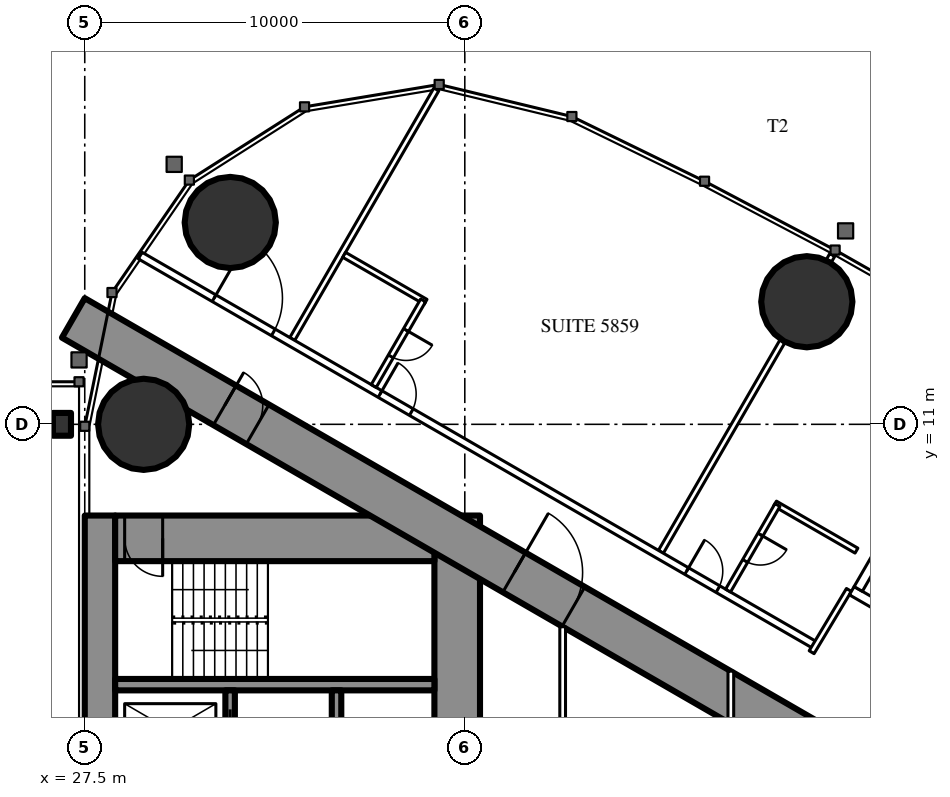
"""IFC4 building model, lengths in metres.
Left out: names, types, materials, properties, quantities, classifications, styles, units other than length and angle.
Written with IfcOpenShell. Run it as: python <this file> out.ifc"""

import sys

from ifc_helpers import new_model, si_unit, direction, frame, frame_2d, origin, origin_2d, place, context, subcontext, project, spatial, rectangle, circle, i_section, extrude, element, fill, save


model = new_model("IFC4")
c1 = context("Model", 3, precision=1e-05, world=origin(), true_north=direction((0.0, 1.0)))
c2 = subcontext(c1, "Body", "Model", "MODEL_VIEW")
j1 = project(units=[si_unit("LENGTHUNIT", "METRE"), si_unit("PLANEANGLEUNIT", "RADIAN")], contexts=[c1])
p1 = place(None, origin())
s1 = spatial("IfcSite", under=j1, at=p1, CompositionType="ELEMENT")
p2 = place(p1, origin())
s2 = spatial("IfcBuilding", under=s1, at=p2, CompositionType="ELEMENT")
p3 = place(p2, frame((0.0, 0.0, 218.9)))
s3 = spatial("IfcBuildingStorey", under=s2, at=p3, CompositionType="ELEMENT", Elevation=218.9)
for number, where, z_axis, x_axis in (
    (1, (31.328, 16.311, 0.0), (0.0, 0.0, 1.0), (1.0, 0.0, 0.0)),
    (2, (29.05, 11.0, 0.0), (0.0, 0.0, 1.0), (1.0, 0.0, 0.0)),
    (3, (46.499, 14.226, 0.0), (0.0, 0.0, 1.0), (1.0, 0.0, 0.0)),
):
    element("IfcColumn", number, at=place(p3, frame(where, z_axis=z_axis, x_axis=x_axis)), inside=s3, PredefinedType="COLUMN", context=c2, shape_type="SweptSolid", body=[
        extrude(circle(Radius=1.2, at=origin_2d()), origin(), (0.0, 0.0, 1.0), 3.6),
    ])
p4 = place(p3, frame((27.9, -8.6, 0.0), z_axis=(0.0, 0.0, 1.0), x_axis=(0.0, 1.0, 0.0)))
e4 = element("IfcWall", 4, at=p4, inside=s3, PredefinedType="SHEAR", context=c2, shape_type="SweptSolid", body=[
    extrude(rectangle(XDim=17.2, YDim=0.8, at=frame_2d((8.6, 0.0))), origin(), (0.0, 0.0, 1.0), 3.6),
])
p5 = place(p4, frame((9.35, 0.0, 0.0)))
e5 = element("IfcOpeningElement", 5, at=p5, cuts=e4, PredefinedType="OPENING", context=c2, shape_type="SweptSolid", body=[
    extrude(rectangle(XDim=0.9, YDim=2.2, at=frame_2d((0.45, 1.1))), frame((0.0, 0.41, 0.0), z_axis=(0.0, -1.0, 0.0), x_axis=(1.0, 0.0, 0.0)), (0.0, 0.0, 1.0), 0.82),
])
p6 = place(p3, frame((37.3, -8.6, 0.0), z_axis=(0.0, 0.0, 1.0), x_axis=(0.0, 1.0, 0.0)))
e6 = element("IfcWall", 6, at=p6, inside=s3, PredefinedType="SHEAR", context=c2, shape_type="SweptSolid", body=[
    extrude(rectangle(XDim=17.2, YDim=1.2, at=frame_2d((8.6, 0.0))), origin(), (0.0, 0.0, 1.0), 3.6),
])
p7 = place(p6, frame((7.7, 0.0, 0.0)))
e7 = element("IfcOpeningElement", 7, at=p7, cuts=e6, PredefinedType="OPENING", context=c2, shape_type="SweptSolid", body=[
    extrude(rectangle(XDim=1.8, YDim=2.2, at=frame_2d((0.9, 1.1))), frame((0.0, 0.61, 0.0), z_axis=(0.0, -1.0, 0.0), x_axis=(1.0, 0.0, 0.0)), (0.0, 0.0, 1.0), 1.22),
])
p8 = place(p3, frame((28.3, 8.0, 0.0), z_axis=(0.0, 0.0, 1.0), x_axis=(1.0, 0.0, 0.0)))
e8 = element("IfcWall", 8, at=p8, inside=s3, PredefinedType="SHEAR", context=c2, shape_type="SweptSolid", body=[
    extrude(rectangle(XDim=8.4, YDim=1.2, at=frame_2d((4.2, 0.0))), origin(), (0.0, 0.0, 1.0), 3.6),
])
p9 = place(p8, frame((0.25, 0.0, 0.0)))
e9 = element("IfcOpeningElement", 9, at=p9, cuts=e8, PredefinedType="OPENING", context=c2, shape_type="SweptSolid", body=[
    extrude(rectangle(XDim=1.0, YDim=2.2, at=frame_2d((0.5, 1.1))), frame((0.0, 0.61, 0.0), z_axis=(0.0, -1.0, 0.0), x_axis=(1.0, 0.0, 0.0)), (0.0, 0.0, 1.0), 1.22),
])
p10 = place(p3, frame((28.3, 4.15, 0.0), z_axis=(0.0, 0.0, 1.0), x_axis=(1.0, 0.0, 0.0)))
e10 = element("IfcWall", 10, at=p10, inside=s3, PredefinedType="SHEAR", context=c2, shape_type="SweptSolid", body=[
    extrude(rectangle(XDim=8.4, YDim=0.3, at=frame_2d((4.2, 0.0))), origin(), (0.0, 0.0, 1.0), 3.6),
])
p11 = place(p3, frame((31.325, 1.9, 0.0), z_axis=(0.0, 0.0, 1.0), x_axis=(0.0, 1.0, 0.0)))
e11 = element("IfcWall", 11, at=p11, inside=s3, PredefinedType="SHEAR", context=c2, shape_type="SweptSolid", body=[
    extrude(rectangle(XDim=2.1, YDim=0.25, at=frame_2d((1.05, 0.0))), origin(), (0.0, 0.0, 1.0), 3.6),
])
p12 = place(p11, frame((0.5, 0.0, 0.0)))
e12 = element("IfcOpeningElement", 12, at=p12, cuts=e11, PredefinedType="OPENING", context=c2, shape_type="SweptSolid", body=[
    extrude(rectangle(XDim=1.1, YDim=2.2, at=frame_2d((0.55, 1.1))), frame((0.0, 0.135, 0.0), z_axis=(0.0, -1.0, 0.0), x_axis=(1.0, 0.0, 0.0)), (0.0, 0.0, 1.0), 0.27),
])
p13 = place(p3, frame((34.125, 1.65, 0.0), z_axis=(0.0, 0.0, 1.0), x_axis=(0.0, 1.0, 0.0)))
e13 = element("IfcWall", 13, at=p13, inside=s3, PredefinedType="SHEAR", context=c2, shape_type="SweptSolid", body=[
    extrude(rectangle(XDim=2.35, YDim=0.25, at=frame_2d((1.175, 0.0))), origin(), (0.0, 0.0, 1.0), 3.6),
])
p14 = place(p3, frame((27.2, 13.8, 0.0), z_axis=(0.0, 0.0, 1.0), x_axis=(0.866024515034, -0.500001539357, 0.0)))
e14 = element("IfcWall", 14, at=p14, inside=s3, PredefinedType="SHEAR", context=c2, shape_type="SweptSolid", body=[
    extrude(rectangle(XDim=26.907, YDim=1.2, at=frame_2d((13.454, 0.0))), origin(), (0.0, 0.0, 1.0), 3.6),
])
p15 = place(p14, frame((4.6, 0.0, 0.0)))
e15 = element("IfcOpeningElement", 15, at=p15, cuts=e14, PredefinedType="OPENING", context=c2, shape_type="SweptSolid", body=[
    extrude(rectangle(XDim=1.0, YDim=2.2, at=frame_2d((0.5, 1.1))), frame((0.0, 0.61, 0.0), z_axis=(0.0, -1.0, 0.0), x_axis=(1.0, 0.0, 0.0)), (0.0, 0.0, 1.0), 1.22),
])
p16 = place(p14, frame((13.395, 0.0, 0.0)))
e16 = element("IfcOpeningElement", 16, at=p16, cuts=e14, PredefinedType="OPENING", context=c2, shape_type="SweptSolid", body=[
    extrude(rectangle(XDim=1.8, YDim=2.2, at=frame_2d((0.9, 1.1))), frame((0.0, 0.61, 0.0), z_axis=(0.0, -1.0, 0.0), x_axis=(1.0, 0.0, 0.0)), (0.0, 0.0, 1.0), 1.22),
])
p17 = place(p3, frame((26.9, 11.0, 0.0), z_axis=(0.0, 0.0, 1.0), x_axis=(1.0, 0.0, 0.0)))
e17 = element("IfcColumn", 17, at=p17, inside=s3, PredefinedType="COLUMN", context=c2, shape_type="SweptSolid", body=[
    extrude(i_section(OverallWidth=0.476, OverallDepth=0.6, WebThickness=0.1, FlangeThickness=0.14, FilletRadius=0.02, at=origin_2d()), origin(), (0.0, 0.0, 1.0), 3.6),
])
p18 = place(p3, frame((32.96, 13.246, 0.0), z_axis=(0.0, 0.0, 1.0), x_axis=(0.500000236886, 0.866025267018, 0.0)))
e18 = element("IfcWall", 18, at=p18, inside=s3, PredefinedType="PARTITIONING", context=c2, shape_type="SweptSolid", body=[
    extrude(rectangle(XDim=7.583, YDim=0.15, at=frame_2d((3.791, 0.0))), origin(), (0.0, 0.0, 1.0), 3.35),
])
p19 = place(p3, frame((42.66, 7.646, 0.0), z_axis=(0.0, 0.0, 1.0), x_axis=(0.499996592859, 0.866027370889, 0.0)))
e19 = element("IfcWall", 19, at=p19, inside=s3, PredefinedType="PARTITIONING", context=c2, shape_type="SweptSolid", body=[
    extrude(rectangle(XDim=6.398, YDim=0.15, at=frame_2d((3.199, 0.0))), origin(), (0.0, 0.0, 1.0), 2.45),
])
p20 = place(p3, frame((47.079, 15.3, 0.0), z_axis=(0.0, 0.0, 1.0), x_axis=(0.499212083968, 0.866479829667, 0.0)))
e20 = element("IfcWall", 20, at=p20, inside=s3, PredefinedType="PARTITIONING", context=c2, shape_type="SweptSolid", body=[
    extrude(rectangle(XDim=0.179, YDim=0.15, at=frame_2d((0.09, 0.0))), origin(), (0.0, 0.0, 1.0), 2.45),
])
p21 = place(p3, frame((28.959, 15.44, 0.0), z_axis=(0.0, 0.0, 1.0), x_axis=(0.866028936079, -0.499993881836, 0.0)))
e21 = element("IfcWall", 21, at=p21, inside=s3, PredefinedType="PARTITIONING", context=c2, shape_type="SweptSolid", body=[
    extrude(rectangle(XDim=20.503, YDim=0.2, at=frame_2d((10.251, 0.0))), origin(), (0.0, 0.0, 1.0), 3.35),
])
p22 = place(p21, frame((16.603, 0.0, 0.0)))
e22 = element("IfcOpeningElement", 22, at=p22, cuts=e21, PredefinedType="OPENING", context=c2, shape_type="SweptSolid", body=[
    extrude(rectangle(XDim=0.95, YDim=2.2, at=frame_2d((0.475, 1.1))), frame((0.0, 0.11, 0.0), z_axis=(0.0, -1.0, 0.0), x_axis=(1.0, 0.0, 0.0)), (0.0, 0.0, 1.0), 0.22),
])
p23 = place(p21, frame((7.287, 0.0, 0.0)))
e23 = element("IfcOpeningElement", 23, at=p23, cuts=e21, PredefinedType="OPENING", context=c2, shape_type="SweptSolid", body=[
    extrude(rectangle(XDim=0.95, YDim=2.2, at=frame_2d((0.475, 1.1))), frame((0.0, 0.11, 0.0), z_axis=(0.0, -1.0, 0.0), x_axis=(1.0, 0.0, 0.0)), (0.0, 0.0, 1.0), 0.22),
])
p24 = place(p21, frame((2.244, 0.0, 0.0)))
e24 = element("IfcOpeningElement", 24, at=p24, cuts=e21, PredefinedType="OPENING", context=c2, shape_type="SweptSolid", body=[
    extrude(rectangle(XDim=1.8, YDim=2.03, at=frame_2d((0.9, 1.015))), frame((0.0, 0.11, 0.0), z_axis=(0.0, -1.0, 0.0), x_axis=(1.0, 0.0, 0.0)), (0.0, 0.0, 1.0), 0.22),
])
p25 = place(p3, frame((47.606, 6.642, 0.0), z_axis=(0.0, 0.0, 1.0), x_axis=(-0.51353662755, -0.858067673418, 0.0)))
e25 = element("IfcWall", 25, at=p25, inside=s3, PredefinedType="PARTITIONING", context=c2, shape_type="SweptSolid", body=[
    extrude(rectangle(XDim=1.91, YDim=0.15, at=frame_2d((0.955, 0.0))), origin(), (0.0, 0.0, 1.0), 3.35),
])
p26 = place(p3, frame((45.662, 8.914, 0.0), z_axis=(0.0, 0.0, 1.0), x_axis=(0.86604923931, -0.499958713387, 0.0)))
e26 = element("IfcWall", 26, at=p26, inside=s3, PredefinedType="PARTITIONING", context=c2, shape_type="SweptSolid", body=[
    extrude(rectangle(XDim=2.475, YDim=0.15, at=frame_2d((1.237, 0.0))), origin(), (0.0, 0.0, 1.0), 3.35),
])
p27 = place(p3, frame((44.427, 6.625, 0.0), z_axis=(0.0, 0.0, 1.0), x_axis=(0.500006934395, 0.866021400173, 0.0)))
e27 = element("IfcWall", 27, at=p27, inside=s3, PredefinedType="PARTITIONING", context=c2, shape_type="SweptSolid", body=[
    extrude(rectangle(XDim=2.6, YDim=0.15, at=frame_2d((1.3, 0.0))), origin(), (0.0, 0.0, 1.0), 3.35),
])
p28 = place(p27, frame((0.9, 0.0, 0.0)))
e28 = element("IfcOpeningElement", 28, at=p28, cuts=e27, PredefinedType="OPENING", context=c2, shape_type="SweptSolid", body=[
    extrude(rectangle(XDim=0.8, YDim=2.2, at=frame_2d((0.4, 1.1))), frame((0.0, 0.085, 0.0), z_axis=(0.0, -1.0, 0.0), x_axis=(1.0, 0.0, 0.0)), (0.0, 0.0, 1.0), 0.17),
])
p29 = place(p3, frame((34.325, 15.46, 0.0), z_axis=(0.0, 0.0, 1.0), x_axis=(0.866031185235, -0.4999899861, 0.0)))
e29 = element("IfcWall", 29, at=p29, inside=s3, PredefinedType="PARTITIONING", context=c2, shape_type="SweptSolid", body=[
    extrude(rectangle(XDim=2.475, YDim=0.15, at=frame_2d((1.238, 0.0))), origin(), (0.0, 0.0, 1.0), 3.35),
])
p30 = place(p3, frame((35.104, 12.008, 0.0), z_axis=(0.0, 0.0, 1.0), x_axis=(0.500047596559, 0.865997922154, 0.0)))
e30 = element("IfcWall", 30, at=p30, inside=s3, PredefinedType="PARTITIONING", context=c2, shape_type="SweptSolid", body=[
    extrude(rectangle(XDim=2.6, YDim=0.15, at=frame_2d((1.3, 0.0))), origin(), (0.0, 0.0, 1.0), 3.35),
])
p31 = place(p30, frame((0.9, 0.0, 0.0)))
e31 = element("IfcOpeningElement", 31, at=p31, cuts=e30, PredefinedType="OPENING", context=c2, shape_type="SweptSolid", body=[
    extrude(rectangle(XDim=0.8, YDim=2.2, at=frame_2d((0.4, 1.1))), frame((0.0, 0.085, 0.0), z_axis=(0.0, -1.0, 0.0), x_axis=(1.0, 0.0, 0.0)), (0.0, 0.0, 1.0), 0.17),
])
p32 = place(p3, frame((40.075, -5.674, 0.0), z_axis=(0.0, 0.0, 1.0), x_axis=(0.0, 1.0, 0.0)))
e32 = element("IfcWall", 32, at=p32, inside=s3, PredefinedType="PARTITIONING", context=c2, shape_type="SweptSolid", body=[
    extrude(rectangle(XDim=11.348, YDim=0.15, at=frame_2d((5.674, 0.0))), origin(), (0.0, 0.0, 1.0), 3.35),
])
p33 = place(p32, frame((4.774, 0.0, 0.0)))
e33 = element("IfcOpeningElement", 33, at=p33, cuts=e32, PredefinedType="OPENING", context=c2, shape_type="SweptSolid", body=[
    extrude(rectangle(XDim=1.8, YDim=2.2, at=frame_2d((0.9, 1.1))), frame((0.0, 0.085, 0.0), z_axis=(0.0, -1.0, 0.0), x_axis=(1.0, 0.0, 0.0)), (0.0, 0.0, 1.0), 0.17),
])
p34 = place(p3, frame((44.5, -4.505, 0.0), z_axis=(0.0, 0.0, 1.0), x_axis=(0.0, 1.0, 0.0)))
e34 = element("IfcWall", 34, at=p34, inside=s3, PredefinedType="PARTITIONING", context=c2, shape_type="SweptSolid", body=[
    extrude(rectangle(XDim=9.009, YDim=0.15, at=frame_2d((4.505, 0.0))), origin(), (0.0, 0.0, 1.0), 3.35),
])
p35 = place(p34, frame((1.752, 0.0, 0.0)))
e35 = element("IfcOpeningElement", 35, at=p35, cuts=e34, PredefinedType="OPENING", context=c2, shape_type="SweptSolid", body=[
    extrude(rectangle(XDim=1.0, YDim=2.2, at=frame_2d((0.5, 1.1))), frame((0.0, 0.085, 0.0), z_axis=(0.0, -1.0, 0.0), x_axis=(1.0, 0.0, 0.0)), (0.0, 0.0, 1.0), 0.17),
])
p36 = place(p34, frame((6.257, 0.0, 0.0)))
e36 = element("IfcOpeningElement", 36, at=p36, cuts=e34, PredefinedType="OPENING", context=c2, shape_type="SweptSolid", body=[
    extrude(rectangle(XDim=1.0, YDim=2.2, at=frame_2d((0.5, 1.1))), frame((0.0, 0.085, 0.0), z_axis=(0.0, -1.0, 0.0), x_axis=(1.0, 0.0, 0.0)), (0.0, 0.0, 1.0), 0.17),
])
p37 = place(p3, frame((47.681, 6.622, 0.0), z_axis=(0.0, 0.0, 1.0), x_axis=(0.86603344179, -0.499986077507, 0.0)))
e37 = element("IfcWall", 37, at=p37, inside=s3, PredefinedType="PARTITIONING", context=c2, shape_type="SweptSolid", body=[
    extrude(rectangle(XDim=6.6, YDim=0.25, at=frame_2d((3.3, 0.0))), origin(), (0.0, 0.0, 1.0), 3.35),
])
p38 = place(p37, frame((0.75, 0.0, 0.0)))
e38 = element("IfcOpeningElement", 38, at=p38, cuts=e37, PredefinedType="OPENING", context=c2, shape_type="SweptSolid", body=[
    extrude(rectangle(XDim=1.1, YDim=2.2, at=frame_2d((0.55, 1.1))), frame((0.0, 0.135, 0.0), z_axis=(0.0, -1.0, 0.0), x_axis=(1.0, 0.0, 0.0)), (0.0, 0.0, 1.0), 0.27),
])
p39 = place(p37, frame((2.75, 0.0, 0.0)))
e39 = element("IfcOpeningElement", 39, at=p39, cuts=e37, PredefinedType="OPENING", context=c2, shape_type="SweptSolid", body=[
    extrude(rectangle(XDim=1.1, YDim=2.2, at=frame_2d((0.55, 1.1))), frame((0.0, 0.135, 0.0), z_axis=(0.0, -1.0, 0.0), x_axis=(1.0, 0.0, 0.0)), (0.0, 0.0, 1.0), 0.27),
])
p40 = place(p37, frame((4.75, 0.0, 0.0)))
e40 = element("IfcOpeningElement", 40, at=p40, cuts=e37, PredefinedType="OPENING", context=c2, shape_type="SweptSolid", body=[
    extrude(rectangle(XDim=1.1, YDim=2.2, at=frame_2d((0.55, 1.1))), frame((0.0, 0.135, 0.0), z_axis=(0.0, -1.0, 0.0), x_axis=(1.0, 0.0, 0.0)), (0.0, 0.0, 1.0), 0.27),
])
p41 = place(p3, frame((47.852, 6.668, 0.0), z_axis=(0.0, 0.0, 1.0), x_axis=(0.499929347863, 0.866066190972, 0.0)))
e41 = element("IfcWall", 41, at=p41, inside=s3, PredefinedType="PARTITIONING", context=c2, shape_type="SweptSolid", body=[
    extrude(rectangle(XDim=3.201, YDim=0.25, at=frame_2d((1.6, 0.0))), origin(), (0.0, 0.0, 1.0), 3.35),
])
p42 = place(p28, origin())
e42 = element("IfcDoor", 42, at=p42, inside=s3, OperationType="SINGLE_SWING_RIGHT", PredefinedType="DOOR", context=c2, shape_type="SweptSolid", body=[
    extrude(rectangle(XDim=0.8, YDim=2.2, at=frame_2d((0.4, 1.1))), frame((0.0, 0.025, 0.0), z_axis=(0.0, -1.0, 0.0), x_axis=(1.0, 0.0, 0.0)), (0.0, 0.0, 1.0), 0.05),
])
fill(e28, e42)
p43 = place(p22, origin())
e43 = element("IfcDoor", 43, at=p43, inside=s3, OperationType="SINGLE_SWING_LEFT", PredefinedType="DOOR", context=c2, shape_type="SweptSolid", body=[
    extrude(rectangle(XDim=0.95, YDim=2.2, at=frame_2d((0.475, 1.1))), frame((0.0, 0.025, 0.0), z_axis=(0.0, -1.0, 0.0), x_axis=(1.0, 0.0, 0.0)), (0.0, 0.0, 1.0), 0.05),
])
fill(e22, e43)
p44 = place(p31, origin())
e44 = element("IfcDoor", 44, at=p44, inside=s3, OperationType="SINGLE_SWING_RIGHT", PredefinedType="DOOR", context=c2, shape_type="SweptSolid", body=[
    extrude(rectangle(XDim=0.8, YDim=2.2, at=frame_2d((0.4, 1.1))), frame((0.0, 0.025, 0.0), z_axis=(0.0, -1.0, 0.0), x_axis=(1.0, 0.0, 0.0)), (0.0, 0.0, 1.0), 0.05),
])
fill(e31, e44)
p45 = place(p23, origin())
e45 = element("IfcDoor", 45, at=p45, inside=s3, OperationType="SINGLE_SWING_LEFT", PredefinedType="DOOR", context=c2, shape_type="SweptSolid", body=[
    extrude(rectangle(XDim=0.95, YDim=2.2, at=frame_2d((0.475, 1.1))), frame((0.0, 0.025, 0.0), z_axis=(0.0, -1.0, 0.0), x_axis=(1.0, 0.0, 0.0)), (0.0, 0.0, 1.0), 0.05),
])
fill(e23, e45)
p46 = place(p24, origin())
e46 = element("IfcDoor", 46, at=p46, inside=s3, OperationType="DOUBLE_DOOR_SINGLE_SWING", PredefinedType="DOOR", context=c2, shape_type="SweptSolid", body=[
    extrude(rectangle(XDim=1.8, YDim=2.03, at=frame_2d((0.9, 1.015))), frame((0.0, 0.025, 0.0), z_axis=(0.0, -1.0, 0.0), x_axis=(1.0, 0.0, 0.0)), (0.0, 0.0, 1.0), 0.05),
])
fill(e24, e46)
p47 = place(p15, origin())
e47 = element("IfcDoor", 47, at=p47, inside=s3, OperationType="SINGLE_SWING_LEFT", PredefinedType="DOOR", context=c2, shape_type="SweptSolid", body=[
    extrude(rectangle(XDim=1.0, YDim=2.2, at=frame_2d((0.5, 1.1))), frame((0.0, 0.025, 0.0), z_axis=(0.0, -1.0, 0.0), x_axis=(1.0, 0.0, 0.0)), (0.0, 0.0, 1.0), 0.05),
])
fill(e15, e47)
p48 = place(p16, origin())
e48 = element("IfcDoor", 48, at=p48, inside=s3, OperationType="DOUBLE_DOOR_SINGLE_SWING", PredefinedType="DOOR", context=c2, shape_type="SweptSolid", body=[
    extrude(rectangle(XDim=1.8, YDim=2.2, at=frame_2d((0.9, 1.1))), frame((0.0, 0.025, 0.0), z_axis=(0.0, -1.0, 0.0), x_axis=(1.0, 0.0, 0.0)), (0.0, 0.0, 1.0), 0.05),
])
fill(e16, e48)
p49 = place(p9, origin())
e49 = element("IfcDoor", 49, at=p49, inside=s3, OperationType="SINGLE_SWING_RIGHT", PredefinedType="DOOR", context=c2, shape_type="SweptSolid", body=[
    extrude(rectangle(XDim=1.0, YDim=2.2, at=frame_2d((0.5, 1.1))), frame((0.0, 0.025, 0.0), z_axis=(0.0, -1.0, 0.0), x_axis=(1.0, 0.0, 0.0)), (0.0, 0.0, 1.0), 0.05),
])
fill(e9, e49)
p50 = place(p12, origin())
e50 = element("IfcDoor", 50, at=p50, inside=s3, OperationType="SLIDING_TO_LEFT", PredefinedType="USERDEFINED", context=c2, shape_type="SweptSolid", body=[
    extrude(rectangle(XDim=1.1, YDim=2.2, at=frame_2d((0.55, 1.1))), frame((0.0, 0.025, 0.0), z_axis=(0.0, -1.0, 0.0), x_axis=(1.0, 0.0, 0.0)), (0.0, 0.0, 1.0), 0.05),
])
fill(e12, e50)
save(model, sys.argv[1])
